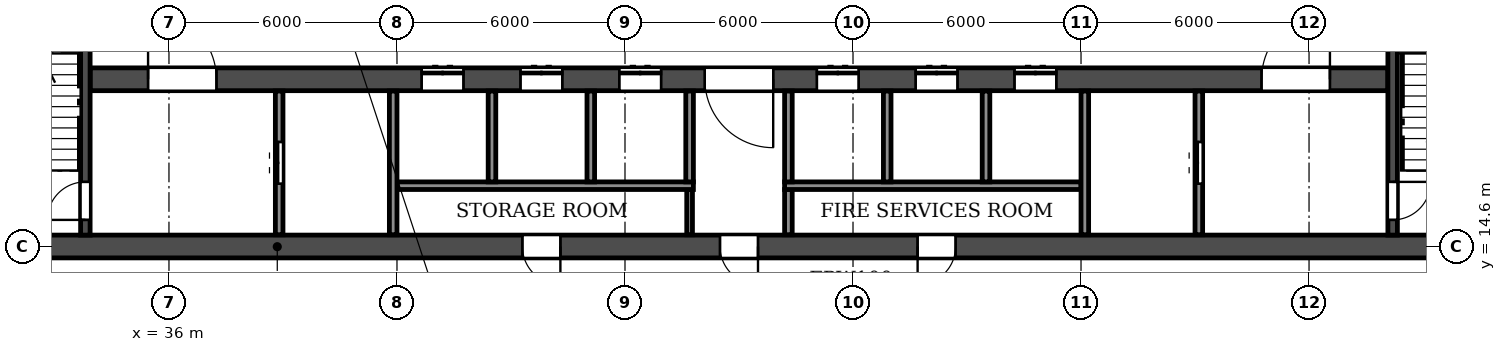
"""IFC4 building model, lengths in metres.
Left out: names, types, materials, properties, quantities, classifications, styles, units other than length and angle.
Written with IfcOpenShell. Run it as: python <this file> out.ifc"""

import sys

from ifc_helpers import new_model, si_unit, direction, frame, frame_2d, origin, place, context, subcontext, project, spatial, rectangle, extrude, element, fill, save


model = new_model("IFC4")
c1 = context("Model", 3, precision=1e-05, world=origin(), true_north=direction((0.0, 1.0)))
c2 = subcontext(c1, "Body", "Model", "MODEL_VIEW")
j1 = project(units=[si_unit("LENGTHUNIT", "METRE"), si_unit("PLANEANGLEUNIT", "RADIAN")], contexts=[c1])
p1 = place(None, origin())
s1 = spatial("IfcSite", under=j1, at=p1, CompositionType="ELEMENT")
p2 = place(p1, origin())
s2 = spatial("IfcBuilding", under=s1, at=p2, CompositionType="ELEMENT")
p3 = place(p2, frame((0.0, 0.0, 33.3)))
s3 = spatial("IfcBuildingStorey", under=s2, at=p3, CompositionType="ELEMENT", Elevation=33.3)
p4 = place(p3, frame((2.6, 14.6, 0.0), z_axis=(0.0, 0.0, 1.0), x_axis=(1.0, 0.0, 0.0)))
e1 = element("IfcWall", 1, at=p4, inside=s3, PredefinedType="SOLIDWALL", context=c2, shape_type="SweptSolid", body=[
    extrude(rectangle(XDim=96.8, YDim=0.6, at=frame_2d((48.4, 0.0))), origin(), (0.0, 0.0, 1.0), 3.05),
])
p5 = place(p4, frame((1.8, 0.0, 0.0)))
e2 = element("IfcOpeningElement", 2, at=p5, cuts=e1, PredefinedType="OPENING", context=c2, shape_type="SweptSolid", body=[
    extrude(rectangle(XDim=1.0, YDim=2.1, at=frame_2d((0.5, 1.05))), frame((0.0, 0.31, 0.0), z_axis=(0.0, -1.0, 0.0), x_axis=(1.0, 0.0, 0.0)), (0.0, 0.0, 1.0), 0.62),
])
p6 = place(p4, frame((9.5, 0.0, 0.0)))
e3 = element("IfcOpeningElement", 3, at=p6, cuts=e1, PredefinedType="OPENING", context=c2, shape_type="SweptSolid", body=[
    extrude(rectangle(XDim=1.0, YDim=2.1, at=frame_2d((0.5, 1.05))), frame((0.0, 0.31, 0.0), z_axis=(0.0, -1.0, 0.0), x_axis=(1.0, 0.0, 0.0)), (0.0, 0.0, 1.0), 0.62),
])
p7 = place(p4, frame((16.3, 0.0, 0.0)))
e4 = element("IfcOpeningElement", 4, at=p7, cuts=e1, PredefinedType="OPENING", context=c2, shape_type="SweptSolid", body=[
    extrude(rectangle(XDim=1.0, YDim=2.1, at=frame_2d((0.5, 1.05))), frame((0.0, 0.31, 0.0), z_axis=(0.0, -1.0, 0.0), x_axis=(1.0, 0.0, 0.0)), (0.0, 0.0, 1.0), 0.62),
])
p8 = place(p4, frame((24.2, 0.0, 0.0)))
e5 = element("IfcOpeningElement", 5, at=p8, cuts=e1, PredefinedType="OPENING", context=c2, shape_type="SweptSolid", body=[
    extrude(rectangle(XDim=1.0, YDim=2.1, at=frame_2d((0.5, 1.05))), frame((0.0, 0.31, 0.0), z_axis=(0.0, -1.0, 0.0), x_axis=(1.0, 0.0, 0.0)), (0.0, 0.0, 1.0), 0.62),
])
p9 = place(p4, frame((28.8, 0.0, 0.0)))
e6 = element("IfcOpeningElement", 6, at=p9, cuts=e1, PredefinedType="OPENING", context=c2, shape_type="SweptSolid", body=[
    extrude(rectangle(XDim=1.0, YDim=2.1, at=frame_2d((0.5, 1.05))), frame((0.0, 0.31, 0.0), z_axis=(0.0, -1.0, 0.0), x_axis=(1.0, 0.0, 0.0)), (0.0, 0.0, 1.0), 0.62),
])
p10 = place(p4, frame((42.7, 0.0, 0.0)))
e7 = element("IfcOpeningElement", 7, at=p10, cuts=e1, PredefinedType="OPENING", context=c2, shape_type="SweptSolid", body=[
    extrude(rectangle(XDim=1.0, YDim=2.1, at=frame_2d((0.5, 1.05))), frame((0.0, 0.31, 0.0), z_axis=(0.0, -1.0, 0.0), x_axis=(1.0, 0.0, 0.0)), (0.0, 0.0, 1.0), 0.62),
])
p11 = place(p4, frame((47.9, 0.0, 0.0)))
e8 = element("IfcOpeningElement", 8, at=p11, cuts=e1, PredefinedType="OPENING", context=c2, shape_type="SweptSolid", body=[
    extrude(rectangle(XDim=1.0, YDim=2.1, at=frame_2d((0.5, 1.05))), frame((0.0, 0.31, 0.0), z_axis=(0.0, -1.0, 0.0), x_axis=(1.0, 0.0, 0.0)), (0.0, 0.0, 1.0), 0.62),
])
p12 = place(p4, frame((53.1, 0.0, 0.0)))
e9 = element("IfcOpeningElement", 9, at=p12, cuts=e1, PredefinedType="OPENING", context=c2, shape_type="SweptSolid", body=[
    extrude(rectangle(XDim=1.0, YDim=2.1, at=frame_2d((0.5, 1.05))), frame((0.0, 0.31, 0.0), z_axis=(0.0, -1.0, 0.0), x_axis=(1.0, 0.0, 0.0)), (0.0, 0.0, 1.0), 0.62),
])
p13 = place(p4, frame((67.0, 0.0, 0.0)))
e10 = element("IfcOpeningElement", 10, at=p13, cuts=e1, PredefinedType="OPENING", context=c2, shape_type="SweptSolid", body=[
    extrude(rectangle(XDim=1.0, YDim=2.1, at=frame_2d((0.5, 1.05))), frame((0.0, 0.31, 0.0), z_axis=(0.0, -1.0, 0.0), x_axis=(1.0, 0.0, 0.0)), (0.0, 0.0, 1.0), 0.62),
])
p14 = place(p4, frame((71.6, 0.0, 0.0)))
e11 = element("IfcOpeningElement", 11, at=p14, cuts=e1, PredefinedType="OPENING", context=c2, shape_type="SweptSolid", body=[
    extrude(rectangle(XDim=1.0, YDim=2.1, at=frame_2d((0.5, 1.05))), frame((0.0, 0.31, 0.0), z_axis=(0.0, -1.0, 0.0), x_axis=(1.0, 0.0, 0.0)), (0.0, 0.0, 1.0), 0.62),
])
p15 = place(p4, frame((79.5, 0.0, 0.0)))
e12 = element("IfcOpeningElement", 12, at=p15, cuts=e1, PredefinedType="OPENING", context=c2, shape_type="SweptSolid", body=[
    extrude(rectangle(XDim=1.0, YDim=2.1, at=frame_2d((0.5, 1.05))), frame((0.0, 0.31, 0.0), z_axis=(0.0, -1.0, 0.0), x_axis=(1.0, 0.0, 0.0)), (0.0, 0.0, 1.0), 0.62),
])
p16 = place(p4, frame((88.6, 0.0, 0.0)))
e13 = element("IfcOpeningElement", 13, at=p16, cuts=e1, PredefinedType="OPENING", context=c2, shape_type="SweptSolid", body=[
    extrude(rectangle(XDim=1.0, YDim=2.1, at=frame_2d((0.5, 1.05))), frame((0.0, 0.31, 0.0), z_axis=(0.0, -1.0, 0.0), x_axis=(1.0, 0.0, 0.0)), (0.0, 0.0, 1.0), 0.62),
])
p17 = place(p3, frame((33.925, 19.0, 0.0), z_axis=(0.0, 0.0, 1.0), x_axis=(1.0, 0.0, 0.0)))
e14 = element("IfcWall", 14, at=p17, inside=s3, PredefinedType="SOLIDWALL", context=c2, shape_type="SweptSolid", body=[
    extrude(rectangle(XDim=34.15, YDim=0.6, at=frame_2d((17.075, 0.0))), origin(), (0.0, 0.0, 1.0), 3.05),
])
p18 = place(p17, frame((16.175, 0.0, 0.0)))
e15 = element("IfcOpeningElement", 15, at=p18, cuts=e14, PredefinedType="OPENING", context=c2, shape_type="SweptSolid", body=[
    extrude(rectangle(XDim=1.8, YDim=2.1, at=frame_2d((0.9, 1.05))), frame((0.0, 0.31, 0.0), z_axis=(0.0, -1.0, 0.0), x_axis=(1.0, 0.0, 0.0)), (0.0, 0.0, 1.0), 0.62),
])
p19 = place(p17, frame((1.525, 0.0, 0.0)))
e16 = element("IfcOpeningElement", 16, at=p19, cuts=e14, PredefinedType="OPENING", context=c2, shape_type="SweptSolid", body=[
    extrude(rectangle(XDim=1.8, YDim=2.1, at=frame_2d((0.9, 1.05))), frame((0.0, 0.31, 0.0), z_axis=(0.0, -1.0, 0.0), x_axis=(1.0, 0.0, 0.0)), (0.0, 0.0, 1.0), 0.62),
])
p20 = place(p17, frame((8.725, 0.0, 0.0)))
e17 = element("IfcOpeningElement", 17, at=p20, cuts=e14, PredefinedType="OPENING", context=c2, shape_type="SweptSolid", body=[
    extrude(rectangle(XDim=1.1, YDim=2.1, at=frame_2d((0.55, 1.05))), frame((0.0, 0.31, 0.0), z_axis=(0.0, -1.0, 0.0), x_axis=(1.0, 0.0, 0.0)), (0.0, 0.0, 1.0), 0.62),
])
p21 = place(p17, frame((11.325, 0.0, 0.0)))
e18 = element("IfcOpeningElement", 18, at=p21, cuts=e14, PredefinedType="OPENING", context=c2, shape_type="SweptSolid", body=[
    extrude(rectangle(XDim=1.1, YDim=2.1, at=frame_2d((0.55, 1.05))), frame((0.0, 0.31, 0.0), z_axis=(0.0, -1.0, 0.0), x_axis=(1.0, 0.0, 0.0)), (0.0, 0.0, 1.0), 0.62),
])
p22 = place(p17, frame((13.925, 0.0, 0.0)))
e19 = element("IfcOpeningElement", 19, at=p22, cuts=e14, PredefinedType="OPENING", context=c2, shape_type="SweptSolid", body=[
    extrude(rectangle(XDim=1.1, YDim=2.1, at=frame_2d((0.55, 1.05))), frame((0.0, 0.31, 0.0), z_axis=(0.0, -1.0, 0.0), x_axis=(1.0, 0.0, 0.0)), (0.0, 0.0, 1.0), 0.62),
])
p23 = place(p17, frame((19.125, 0.0, 0.0)))
e20 = element("IfcOpeningElement", 20, at=p23, cuts=e14, PredefinedType="OPENING", context=c2, shape_type="SweptSolid", body=[
    extrude(rectangle(XDim=1.1, YDim=2.1, at=frame_2d((0.55, 1.05))), frame((0.0, 0.31, 0.0), z_axis=(0.0, -1.0, 0.0), x_axis=(1.0, 0.0, 0.0)), (0.0, 0.0, 1.0), 0.62),
])
p24 = place(p17, frame((21.725, 0.0, 0.0)))
e21 = element("IfcOpeningElement", 21, at=p24, cuts=e14, PredefinedType="OPENING", context=c2, shape_type="SweptSolid", body=[
    extrude(rectangle(XDim=1.1, YDim=2.1, at=frame_2d((0.55, 1.05))), frame((0.0, 0.31, 0.0), z_axis=(0.0, -1.0, 0.0), x_axis=(1.0, 0.0, 0.0)), (0.0, 0.0, 1.0), 0.62),
])
p25 = place(p17, frame((24.325, 0.0, 0.0)))
e22 = element("IfcOpeningElement", 22, at=p25, cuts=e14, PredefinedType="OPENING", context=c2, shape_type="SweptSolid", body=[
    extrude(rectangle(XDim=1.1, YDim=2.1, at=frame_2d((0.55, 1.05))), frame((0.0, 0.31, 0.0), z_axis=(0.0, -1.0, 0.0), x_axis=(1.0, 0.0, 0.0)), (0.0, 0.0, 1.0), 0.62),
])
p26 = place(p17, frame((30.825, 0.0, 0.0)))
e23 = element("IfcOpeningElement", 23, at=p26, cuts=e14, PredefinedType="OPENING", context=c2, shape_type="SweptSolid", body=[
    extrude(rectangle(XDim=1.8, YDim=2.1, at=frame_2d((0.9, 1.05))), frame((0.0, 0.31, 0.0), z_axis=(0.0, -1.0, 0.0), x_axis=(1.0, 0.0, 0.0)), (0.0, 0.0, 1.0), 0.62),
])
p27 = place(p3, frame((33.8, 14.9, 0.0), z_axis=(0.0, 0.0, 1.0), x_axis=(0.0, 1.0, 0.0)))
e24 = element("IfcWall", 24, at=p27, inside=s3, PredefinedType="SOLIDWALL", context=c2, shape_type="SweptSolid", body=[
    extrude(rectangle(XDim=7.575, YDim=0.25, at=frame_2d((3.788, 0.0))), origin(), (0.0, 0.0, 1.0), 3.05),
])
p28 = place(p27, frame((0.4, 0.0, 0.0)))
e25 = element("IfcOpeningElement", 25, at=p28, cuts=e24, PredefinedType="OPENING", context=c2, shape_type="SweptSolid", body=[
    extrude(rectangle(XDim=1.0, YDim=2.1, at=frame_2d((0.5, 1.05))), frame((0.0, 0.135, 0.0), z_axis=(0.0, -1.0, 0.0), x_axis=(1.0, 0.0, 0.0)), (0.0, 0.0, 1.0), 0.27),
])
p29 = place(p3, frame((68.2, 14.9, 0.0), z_axis=(0.0, 0.0, 1.0), x_axis=(0.0, 1.0, 0.0)))
e26 = element("IfcWall", 26, at=p29, inside=s3, PredefinedType="SOLIDWALL", context=c2, shape_type="SweptSolid", body=[
    extrude(rectangle(XDim=7.575, YDim=0.25, at=frame_2d((3.788, 0.0))), origin(), (0.0, 0.0, 1.0), 3.05),
])
p30 = place(p29, frame((0.4, 0.0, 0.0)))
e27 = element("IfcOpeningElement", 27, at=p30, cuts=e26, PredefinedType="OPENING", context=c2, shape_type="SweptSolid", body=[
    extrude(rectangle(XDim=1.0, YDim=2.1, at=frame_2d((0.5, 1.05))), frame((0.0, 0.135, 0.0), z_axis=(0.0, -1.0, 0.0), x_axis=(1.0, 0.0, 0.0)), (0.0, 0.0, 1.0), 0.27),
])
p31 = place(p3, frame((49.7, 14.91, 0.0), z_axis=(0.0, 0.0, 1.0), x_axis=(0.0, 1.0, 0.0)))
e28 = element("IfcWall", 28, at=p31, inside=s3, PredefinedType="PARTITIONING", context=c2, shape_type="SweptSolid", body=[
    extrude(rectangle(XDim=1.19, YDim=0.15, at=frame_2d((0.595, 0.0))), origin(), (0.0, 0.0, 1.0), 3.05),
])
p32 = place(p3, frame((52.3, 14.91, 0.0), z_axis=(0.0, 0.0, 1.0), x_axis=(0.0, 1.0, 0.0)))
e29 = element("IfcWall", 29, at=p32, inside=s3, PredefinedType="PARTITIONING", context=c2, shape_type="SweptSolid", body=[
    extrude(rectangle(XDim=1.19, YDim=0.2, at=frame_2d((0.595, 0.0))), origin(), (0.0, 0.0, 1.0), 3.05),
])
for number, where, z_axis, x_axis in (
    (30, (42.0, 16.2, 0.0), (0.0, 0.0, 1.0), (1.0, 0.0, 0.0)),
    (31, (52.2, 16.2, 0.0), (0.0, 0.0, 1.0), (1.0, 0.0, 0.0)),
):
    element("IfcWall", number, at=place(p3, frame(where, z_axis=z_axis, x_axis=x_axis)), inside=s3, PredefinedType="PARTITIONING", context=c2, shape_type="SweptSolid", body=[
        extrude(rectangle(XDim=7.8, YDim=0.2, at=frame_2d((3.9, 0.0))), origin(), (0.0, 0.0, 1.0), 3.05),
    ])
p33 = place(p3, frame((38.9, 14.91, 0.0), z_axis=(0.0, 0.0, 1.0), x_axis=(0.0, 1.0, 0.0)))
e32 = element("IfcWall", 32, at=p33, inside=s3, PredefinedType="PARTITIONING", context=c2, shape_type="SweptSolid", body=[
    extrude(rectangle(XDim=3.78, YDim=0.2, at=frame_2d((1.89, 0.0))), origin(), (0.0, 0.0, 1.0), 3.05),
])
p34 = place(p33, frame((1.34, 0.0, 0.0)))
e33 = element("IfcOpeningElement", 33, at=p34, cuts=e32, PredefinedType="OPENING", context=c2, shape_type="SweptSolid", body=[
    extrude(rectangle(XDim=1.1, YDim=2.1, at=frame_2d((0.55, 1.05))), frame((0.0, 0.11, 0.0), z_axis=(0.0, -1.0, 0.0), x_axis=(1.0, 0.0, 0.0)), (0.0, 0.0, 1.0), 0.22),
])
p35 = place(p3, frame((41.9, 14.91, 0.0), z_axis=(0.0, 0.0, 1.0), x_axis=(0.0, 1.0, 0.0)))
e34 = element("IfcWall", 34, at=p35, inside=s3, PredefinedType="PARTITIONING", context=c2, shape_type="SweptSolid", body=[
    extrude(rectangle(XDim=3.78, YDim=0.2, at=frame_2d((1.89, 0.0))), origin(), (0.0, 0.0, 1.0), 3.05),
])
for number, where, z_axis, x_axis in (
    (35, (44.5, 16.3, 0.0), (0.0, 0.0, 1.0), (0.0, 1.0, 0.0)),
    (36, (47.1, 16.3, 0.0), (0.0, 0.0, 1.0), (0.0, 1.0, 0.0)),
    (37, (49.7, 16.3, 0.0), (0.0, 0.0, 1.0), (0.0, 1.0, 0.0)),
    (38, (52.3, 16.3, 0.0), (0.0, 0.0, 1.0), (0.0, 1.0, 0.0)),
    (39, (54.9, 16.3, 0.0), (0.0, 0.0, 1.0), (0.0, 1.0, 0.0)),
    (40, (57.5, 16.3, 0.0), (0.0, 0.0, 1.0), (0.0, 1.0, 0.0)),
):
    element("IfcWall", number, at=place(p3, frame(where, z_axis=z_axis, x_axis=x_axis)), inside=s3, PredefinedType="PARTITIONING", context=c2, shape_type="SweptSolid", body=[
        extrude(rectangle(XDim=2.39, YDim=0.2, at=frame_2d((1.195, 0.0))), origin(), (0.0, 0.0, 1.0), 3.05),
    ])
p36 = place(p3, frame((60.1, 14.91, 0.0), z_axis=(0.0, 0.0, 1.0), x_axis=(0.0, 1.0, 0.0)))
e41 = element("IfcWall", 41, at=p36, inside=s3, PredefinedType="PARTITIONING", context=c2, shape_type="SweptSolid", body=[
    extrude(rectangle(XDim=3.78, YDim=0.2, at=frame_2d((1.89, 0.0))), origin(), (0.0, 0.0, 1.0), 3.05),
])
p37 = place(p3, frame((63.1, 14.91, 0.0), z_axis=(0.0, 0.0, 1.0), x_axis=(0.0, 1.0, 0.0)))
e42 = element("IfcWall", 42, at=p37, inside=s3, PredefinedType="PARTITIONING", context=c2, shape_type="SweptSolid", body=[
    extrude(rectangle(XDim=3.78, YDim=0.2, at=frame_2d((1.89, 0.0))), origin(), (0.0, 0.0, 1.0), 3.05),
])
p38 = place(p37, frame((1.34, 0.0, 0.0)))
e43 = element("IfcOpeningElement", 43, at=p38, cuts=e42, PredefinedType="OPENING", context=c2, shape_type="SweptSolid", body=[
    extrude(rectangle(XDim=1.1, YDim=2.1, at=frame_2d((0.55, 1.05))), frame((0.0, 0.11, 0.0), z_axis=(0.0, -1.0, 0.0), x_axis=(1.0, 0.0, 0.0)), (0.0, 0.0, 1.0), 0.22),
])
p39 = place(p10, frame((1.0, 0.0, 0.0), z_axis=(0.0, 0.0, 1.0), x_axis=(-1.0, 0.0, 0.0)))
e44 = element("IfcDoor", 44, at=p39, inside=s3, OperationType="SINGLE_SWING_LEFT", PredefinedType="DOOR", context=c2, shape_type="SweptSolid", body=[
    extrude(rectangle(XDim=1.0, YDim=2.1, at=frame_2d((0.5, 1.05))), frame((0.0, 0.025, 0.0), z_axis=(0.0, -1.0, 0.0), x_axis=(1.0, 0.0, 0.0)), (0.0, 0.0, 1.0), 0.05),
])
fill(e7, e44)
p40 = place(p11, frame((1.0, 0.0, 0.0), z_axis=(0.0, 0.0, 1.0), x_axis=(-1.0, 0.0, 0.0)))
e45 = element("IfcDoor", 45, at=p40, inside=s3, OperationType="SINGLE_SWING_LEFT", PredefinedType="DOOR", context=c2, shape_type="SweptSolid", body=[
    extrude(rectangle(XDim=1.0, YDim=2.1, at=frame_2d((0.5, 1.05))), frame((0.0, 0.025, 0.0), z_axis=(0.0, -1.0, 0.0), x_axis=(1.0, 0.0, 0.0)), (0.0, 0.0, 1.0), 0.05),
])
fill(e8, e45)
p41 = place(p12, frame((1.0, 0.0, 0.0), z_axis=(0.0, 0.0, 1.0), x_axis=(-1.0, 0.0, 0.0)))
e46 = element("IfcDoor", 46, at=p41, inside=s3, OperationType="SINGLE_SWING_RIGHT", PredefinedType="DOOR", context=c2, shape_type="SweptSolid", body=[
    extrude(rectangle(XDim=1.0, YDim=2.1, at=frame_2d((0.5, 1.05))), frame((0.0, 0.025, 0.0), z_axis=(0.0, -1.0, 0.0), x_axis=(1.0, 0.0, 0.0)), (0.0, 0.0, 1.0), 0.05),
])
fill(e9, e46)
p42 = place(p38, origin())
e47 = element("IfcDoor", 47, at=p42, inside=s3, OperationType="DOUBLE_DOOR_SLIDING", PredefinedType="DOOR", context=c2, shape_type="SweptSolid", body=[
    extrude(rectangle(XDim=1.1, YDim=2.1, at=frame_2d((0.55, 1.05))), frame((0.0, 0.025, 0.0), z_axis=(0.0, -1.0, 0.0), x_axis=(1.0, 0.0, 0.0)), (0.0, 0.0, 1.0), 0.05),
])
fill(e43, e47)
p43 = place(p30, frame((1.0, 0.0, 0.0), z_axis=(0.0, 0.0, 1.0), x_axis=(-1.0, 0.0, 0.0)))
e48 = element("IfcDoor", 48, at=p43, inside=s3, OperationType="SINGLE_SWING_LEFT", PredefinedType="DOOR", context=c2, shape_type="SweptSolid", body=[
    extrude(rectangle(XDim=1.0, YDim=2.1, at=frame_2d((0.5, 1.05))), frame((0.0, 0.025, 0.0), z_axis=(0.0, -1.0, 0.0), x_axis=(1.0, 0.0, 0.0)), (0.0, 0.0, 1.0), 0.05),
])
fill(e27, e48)
p44 = place(p28, origin())
e49 = element("IfcDoor", 49, at=p44, inside=s3, OperationType="SINGLE_SWING_LEFT", PredefinedType="DOOR", context=c2, shape_type="SweptSolid", body=[
    extrude(rectangle(XDim=1.0, YDim=2.1, at=frame_2d((0.5, 1.05))), frame((0.0, 0.025, 0.0), z_axis=(0.0, -1.0, 0.0), x_axis=(1.0, 0.0, 0.0)), (0.0, 0.0, 1.0), 0.05),
])
fill(e25, e49)
p45 = place(p34, origin())
e50 = element("IfcDoor", 50, at=p45, inside=s3, OperationType="DOUBLE_DOOR_SLIDING", PredefinedType="DOOR", context=c2, shape_type="SweptSolid", body=[
    extrude(rectangle(XDim=1.1, YDim=2.1, at=frame_2d((0.55, 1.05))), frame((0.0, 0.025, 0.0), z_axis=(0.0, -1.0, 0.0), x_axis=(1.0, 0.0, 0.0)), (0.0, 0.0, 1.0), 0.05),
])
fill(e33, e50)
p46 = place(p18, frame((1.8, 0.0, 0.0), z_axis=(0.0, 0.0, 1.0), x_axis=(-1.0, 0.0, 0.0)))
e51 = element("IfcDoor", 51, at=p46, inside=s3, OperationType="DOUBLE_DOOR_SINGLE_SWING", PredefinedType="DOOR", context=c2, shape_type="SweptSolid", body=[
    extrude(rectangle(XDim=1.8, YDim=2.1, at=frame_2d((0.9, 1.05))), frame((0.0, 0.025, 0.0), z_axis=(0.0, -1.0, 0.0), x_axis=(1.0, 0.0, 0.0)), (0.0, 0.0, 1.0), 0.05),
])
fill(e15, e51)
p47 = place(p19, origin())
e52 = element("IfcDoor", 52, at=p47, inside=s3, OperationType="DOUBLE_DOOR_SINGLE_SWING", PredefinedType="DOOR", context=c2, shape_type="SweptSolid", body=[
    extrude(rectangle(XDim=1.8, YDim=2.1, at=frame_2d((0.9, 1.05))), frame((0.0, 0.025, 0.0), z_axis=(0.0, -1.0, 0.0), x_axis=(1.0, 0.0, 0.0)), (0.0, 0.0, 1.0), 0.05),
])
fill(e16, e52)
p48 = place(p20, origin())
e53 = element("IfcDoor", 53, at=p48, inside=s3, OperationType="DOUBLE_DOOR_SLIDING", PredefinedType="DOOR", context=c2, shape_type="SweptSolid", body=[
    extrude(rectangle(XDim=1.1, YDim=2.1, at=frame_2d((0.55, 1.05))), frame((0.0, 0.025, 0.0), z_axis=(0.0, -1.0, 0.0), x_axis=(1.0, 0.0, 0.0)), (0.0, 0.0, 1.0), 0.05),
])
fill(e17, e53)
p49 = place(p21, origin())
e54 = element("IfcDoor", 54, at=p49, inside=s3, OperationType="DOUBLE_DOOR_SLIDING", PredefinedType="DOOR", context=c2, shape_type="SweptSolid", body=[
    extrude(rectangle(XDim=1.1, YDim=2.1, at=frame_2d((0.55, 1.05))), frame((0.0, 0.025, 0.0), z_axis=(0.0, -1.0, 0.0), x_axis=(1.0, 0.0, 0.0)), (0.0, 0.0, 1.0), 0.05),
])
fill(e18, e54)
p50 = place(p22, origin())
e55 = element("IfcDoor", 55, at=p50, inside=s3, OperationType="DOUBLE_DOOR_SLIDING", PredefinedType="DOOR", context=c2, shape_type="SweptSolid", body=[
    extrude(rectangle(XDim=1.1, YDim=2.1, at=frame_2d((0.55, 1.05))), frame((0.0, 0.025, 0.0), z_axis=(0.0, -1.0, 0.0), x_axis=(1.0, 0.0, 0.0)), (0.0, 0.0, 1.0), 0.05),
])
fill(e19, e55)
p51 = place(p23, origin())
e56 = element("IfcDoor", 56, at=p51, inside=s3, OperationType="DOUBLE_DOOR_SLIDING", PredefinedType="DOOR", context=c2, shape_type="SweptSolid", body=[
    extrude(rectangle(XDim=1.1, YDim=2.1, at=frame_2d((0.55, 1.05))), frame((0.0, 0.025, 0.0), z_axis=(0.0, -1.0, 0.0), x_axis=(1.0, 0.0, 0.0)), (0.0, 0.0, 1.0), 0.05),
])
fill(e20, e56)
p52 = place(p24, origin())
e57 = element("IfcDoor", 57, at=p52, inside=s3, OperationType="DOUBLE_DOOR_SLIDING", PredefinedType="DOOR", context=c2, shape_type="SweptSolid", body=[
    extrude(rectangle(XDim=1.1, YDim=2.1, at=frame_2d((0.55, 1.05))), frame((0.0, 0.025, 0.0), z_axis=(0.0, -1.0, 0.0), x_axis=(1.0, 0.0, 0.0)), (0.0, 0.0, 1.0), 0.05),
])
fill(e21, e57)
p53 = place(p25, origin())
e58 = element("IfcDoor", 58, at=p53, inside=s3, OperationType="DOUBLE_DOOR_SLIDING", PredefinedType="DOOR", context=c2, shape_type="SweptSolid", body=[
    extrude(rectangle(XDim=1.1, YDim=2.1, at=frame_2d((0.55, 1.05))), frame((0.0, 0.025, 0.0), z_axis=(0.0, -1.0, 0.0), x_axis=(1.0, 0.0, 0.0)), (0.0, 0.0, 1.0), 0.05),
])
fill(e22, e58)
p54 = place(p26, origin())
e59 = element("IfcDoor", 59, at=p54, inside=s3, OperationType="DOUBLE_DOOR_SINGLE_SWING", PredefinedType="DOOR", context=c2, shape_type="SweptSolid", body=[
    extrude(rectangle(XDim=1.8, YDim=2.1, at=frame_2d((0.9, 1.05))), frame((0.0, 0.025, 0.0), z_axis=(0.0, -1.0, 0.0), x_axis=(1.0, 0.0, 0.0)), (0.0, 0.0, 1.0), 0.05),
])
fill(e23, e59)
save(model, sys.argv[1])
